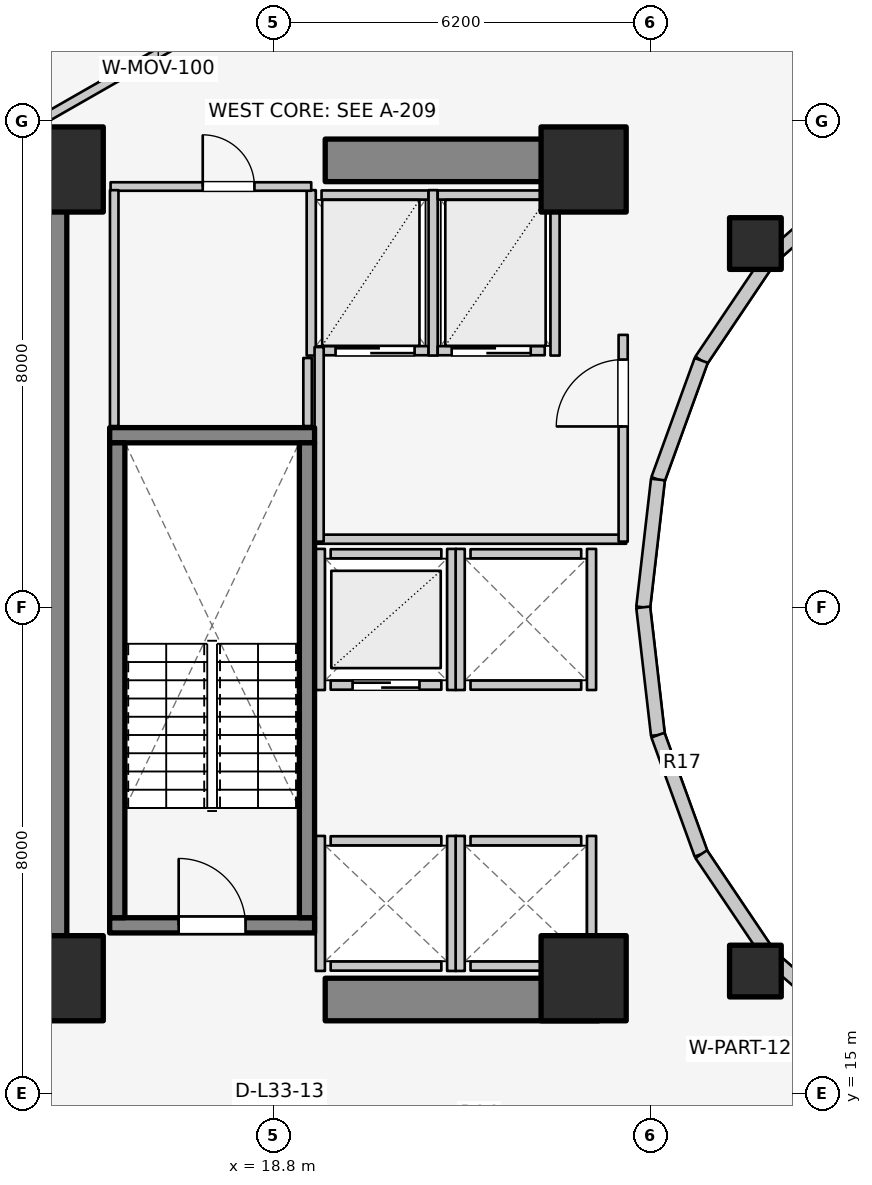
"""IFC4 building model, lengths in metres.
Left out: names, types, materials, properties, quantities, classifications, styles, units other than length and angle.
Written with IfcOpenShell. Run it as: python <this file> out.ifc"""

import sys

from ifc_helpers import new_model, si_unit, direction, frame, frame_2d, origin, origin_2d, place, context, subcontext, project, spatial, rectangle, extrude, element, fill, save


model = new_model("IFC4")
c1 = context("Model", 3, precision=1e-05, world=origin(), true_north=direction((0.0, 1.0)))
c2 = subcontext(c1, "Body", "Model", "MODEL_VIEW")
j1 = project(units=[si_unit("LENGTHUNIT", "METRE"), si_unit("PLANEANGLEUNIT", "RADIAN")], contexts=[c1])
p1 = place(None, origin())
s1 = spatial("IfcSite", under=j1, at=p1, CompositionType="ELEMENT")
p2 = place(p1, origin())
s2 = spatial("IfcBuilding", under=s1, at=p2, CompositionType="ELEMENT")
p3 = place(p2, frame((0.0, 0.0, 110.4)))
s3 = spatial("IfcBuildingStorey", under=s2, at=p3, CompositionType="ELEMENT", Elevation=110.4)
p4 = place(p3, frame((15.05, 17.05, 0.0), z_axis=(0.0, 0.0, 1.0), x_axis=(0.0, 1.0, 0.0)))
e1 = element("IfcWall", 1, at=p4, inside=s3, PredefinedType="SHEAR", context=c2, shape_type="SweptSolid", body=[
    extrude(rectangle(XDim=12.8, YDim=0.7, at=frame_2d((6.4, 0.0))), origin(), (0.0, 0.0, 1.0), 3.1),
])
for number, where, z_axis, x_axis in (
    (2, (19.65, 16.55, 0.0), (0.0, 0.0, 1.0), (1.0, 0.0, 0.0)),
    (3, (19.65, 30.35, 0.0), (0.0, 0.0, 1.0), (1.0, 0.0, 0.0)),
):
    element("IfcWall", number, at=place(p3, frame(where, z_axis=z_axis, x_axis=x_axis)), inside=s3, PredefinedType="SHEAR", context=c2, shape_type="SweptSolid", body=[
        extrude(rectangle(XDim=4.5, YDim=0.7, at=frame_2d((2.25, 0.0))), origin(), (0.0, 0.0, 1.0), 3.1),
    ])
p5 = place(p3, frame((16.105, 17.77, 0.0), z_axis=(0.0, 0.0, 1.0), x_axis=(1.0, 0.0, 0.0)))
e4 = element("IfcWall", 4, at=p5, inside=s3, PredefinedType="SOLIDWALL", context=c2, shape_type="SweptSolid", body=[
    extrude(rectangle(XDim=3.37, YDim=0.25, at=frame_2d((1.685, 0.0))), origin(), (0.0, 0.0, 1.0), 3.1),
])
p6 = place(p5, frame((1.135, 0.0, 0.0)))
e5 = element("IfcOpeningElement", 5, at=p6, cuts=e4, PredefinedType="OPENING", context=c2, shape_type="SweptSolid", body=[
    extrude(rectangle(XDim=1.1, YDim=2.1, at=frame_2d((0.55, 1.05))), frame((0.0, 0.135, 0.0), z_axis=(0.0, -1.0, 0.0), x_axis=(1.0, 0.0, 0.0)), (0.0, 0.0, 1.0), 0.27),
])
p7 = place(p3, frame((16.105, 25.83, 0.0), z_axis=(0.0, 0.0, 1.0), x_axis=(1.0, 0.0, 0.0)))
e6 = element("IfcWall", 6, at=p7, inside=s3, PredefinedType="SOLIDWALL", context=c2, shape_type="SweptSolid", body=[
    extrude(rectangle(XDim=3.37, YDim=0.25, at=frame_2d((1.685, 0.0))), origin(), (0.0, 0.0, 1.0), 3.1),
])
for number, where, z_axis, x_axis in (
    (7, (16.23, 17.895, 0.0), (0.0, 0.0, 1.0), (0.0, 1.0, 0.0)),
    (8, (19.35, 17.895, 0.0), (0.0, 0.0, 1.0), (0.0, 1.0, 0.0)),
):
    element("IfcWall", number, at=place(p3, frame(where, z_axis=z_axis, x_axis=x_axis)), inside=s3, PredefinedType="SOLIDWALL", context=c2, shape_type="SweptSolid", body=[
        extrude(rectangle(XDim=7.81, YDim=0.25, at=frame_2d((3.905, 0.0))), origin(), (0.0, 0.0, 1.0), 3.1),
    ])
for number, where, z_axis, x_axis in (
    (9, (15.3, 16.9, 0.0), (0.0, 0.0, 1.0), (1.0, 0.0, 0.0)),
    (10, (23.9, 16.9, 0.0), (0.0, 0.0, 1.0), (1.0, 0.0, 0.0)),
    (11, (23.9, 30.2, 0.0), (0.0, 0.0, 1.0), (1.0, 0.0, 0.0)),
    (12, (15.3, 30.2, 0.0), (0.0, 0.0, 1.0), (1.0, 0.0, 0.0)),
):
    element("IfcColumn", number, at=place(p3, frame(where, z_axis=z_axis, x_axis=x_axis)), inside=s3, PredefinedType="COLUMN", context=c2, shape_type="SweptSolid", body=[
        extrude(rectangle(XDim=1.4, YDim=1.4, at=origin_2d()), origin(), (0.0, 0.0, 1.0), 3.1),
    ])
for number, where, z_axis, x_axis in (
    (13, (26.725, 28.982, 0.0), (0.0, 0.0, 1.0), (1.0, 0.0, 0.0)),
    (14, (26.725, 17.018, 0.0), (0.0, 0.0, 1.0), (1.0, 0.0, 0.0)),
):
    element("IfcColumn", number, at=place(p3, frame(where, z_axis=z_axis, x_axis=x_axis)), inside=s3, PredefinedType="COLUMN", context=c2, shape_type="SweptSolid", body=[
        extrude(rectangle(XDim=0.85, YDim=0.85, at=origin_2d()), origin(), (0.0, 0.0, 1.0), 3.1),
    ])
p8 = place(p3, frame((28.44, 30.032, 0.0), z_axis=(0.0, 0.0, 1.0), x_axis=(-0.752576694707, -0.658504607869, 0.0)))
e15 = element("IfcWall", 15, at=p8, inside=s3, PredefinedType="STANDARD", context=c2, shape_type="SweptSolid", body=[
    extrude(rectangle(XDim=1.959, YDim=0.23, at=frame_2d((0.98, 0.0))), origin(), (0.0, 0.0, 1.0), 1.22),
])
p9 = place(p3, frame((26.965, 28.742, 0.0), z_axis=(0.0, 0.0, 1.0), x_axis=(-0.558197800898, -0.829707909492, 0.0)))
e16 = element("IfcWall", 16, at=p9, inside=s3, PredefinedType="STANDARD", context=c2, shape_type="SweptSolid", body=[
    extrude(rectangle(XDim=2.027, YDim=0.23, at=frame_2d((1.013, 0.0))), origin(), (0.0, 0.0, 1.0), 1.22),
])
p10 = place(p3, frame((25.834, 27.06, 0.0), z_axis=(0.0, 0.0, 1.0), x_axis=(-0.341423187295, -0.93990968033, 0.0)))
e17 = element("IfcWall", 17, at=p10, inside=s3, PredefinedType="STANDARD", context=c2, shape_type="SweptSolid", body=[
    extrude(rectangle(XDim=2.084, YDim=0.23, at=frame_2d((1.042, 0.0))), origin(), (0.0, 0.0, 1.0), 2.56),
])
for number, where, z_axis, x_axis in (
    (18, (25.123, 25.102, 0.0), (0.0, 0.0, 1.0), (-0.115, -0.993, 0.0)),
    (19, (24.88, 23.0, 0.0), (0.0, 0.0, 1.0), (0.115, -0.993, 0.0)),
):
    element("IfcWall", number, at=place(p3, frame(where, z_axis=z_axis, x_axis=x_axis)), inside=s3, PredefinedType="STANDARD", context=c2, shape_type="SweptSolid", body=[
        extrude(rectangle(XDim=2.115, YDim=0.23, at=frame_2d((1.058, 0.0))), origin(), (0.0, 0.0, 1.0), 2.56),
    ])
p11 = place(p3, frame((25.123, 20.898, 0.0), z_axis=(0.0, 0.0, 1.0), x_axis=(0.341423187295, -0.93990968033, 0.0)))
e20 = element("IfcWall", 20, at=p11, inside=s3, PredefinedType="STANDARD", context=c2, shape_type="SweptSolid", body=[
    extrude(rectangle(XDim=2.084, YDim=0.23, at=frame_2d((1.042, 0.0))), origin(), (0.0, 0.0, 1.0), 2.56),
])
p12 = place(p3, frame((25.834, 18.94, 0.0), z_axis=(0.0, 0.0, 1.0), x_axis=(0.558197800898, -0.829707909492, 0.0)))
e21 = element("IfcWall", 21, at=p12, inside=s3, PredefinedType="STANDARD", context=c2, shape_type="SweptSolid", body=[
    extrude(rectangle(XDim=2.027, YDim=0.23, at=frame_2d((1.013, 0.0))), origin(), (0.0, 0.0, 1.0), 1.22),
])
p13 = place(p3, frame((26.965, 17.258, 0.0), z_axis=(0.0, 0.0, 1.0), x_axis=(0.752576694707, -0.658504607869, 0.0)))
e22 = element("IfcWall", 22, at=p13, inside=s3, PredefinedType="STANDARD", context=c2, shape_type="SweptSolid", body=[
    extrude(rectangle(XDim=1.959, YDim=0.23, at=frame_2d((0.98, 0.0))), origin(), (0.0, 0.0, 1.0), 1.22),
])
for number, where, z_axis, x_axis in (
    (23, (19.74, 19.16, 0.0), (0.0, 0.0, 1.0), (1.0, 0.0, 0.0)),
    (24, (19.74, 17.1, 0.0), (0.0, 0.0, 1.0), (1.0, 0.0, 0.0)),
):
    element("IfcWall", number, at=place(p3, frame(where, z_axis=z_axis, x_axis=x_axis)), inside=s3, PredefinedType="SOLIDWALL", context=c2, shape_type="SweptSolid", body=[
        extrude(rectangle(XDim=1.82, YDim=0.15, at=frame_2d((0.91, 0.0))), origin(), (0.0, 0.0, 1.0), 2.575),
    ])
p14 = place(p3, frame((19.57, 17.02, 0.0), z_axis=(0.0, 0.0, 1.0), x_axis=(0.0, 1.0, 0.0)))
e25 = element("IfcWall", 25, at=p14, inside=s3, PredefinedType="SOLIDWALL", context=c2, shape_type="SweptSolid", body=[
    extrude(rectangle(XDim=2.22, YDim=0.15, at=frame_2d((1.11, 0.0))), origin(), (0.0, 0.0, 1.0), 2.12),
])
p15 = place(p3, frame((21.73, 17.02, 0.0), z_axis=(0.0, 0.0, 1.0), x_axis=(0.0, 1.0, 0.0)))
e26 = element("IfcWall", 26, at=p15, inside=s3, PredefinedType="SOLIDWALL", context=c2, shape_type="SweptSolid", body=[
    extrude(rectangle(XDim=2.22, YDim=0.15, at=frame_2d((1.11, 0.0))), origin(), (0.0, 0.0, 1.0), 2.575),
])
for number, where, z_axis, x_axis in (
    (27, (22.04, 19.16, 0.0), (0.0, 0.0, 1.0), (1.0, 0.0, 0.0)),
    (28, (22.04, 17.1, 0.0), (0.0, 0.0, 1.0), (1.0, 0.0, 0.0)),
):
    element("IfcWall", number, at=place(p3, frame(where, z_axis=z_axis, x_axis=x_axis)), inside=s3, PredefinedType="SOLIDWALL", context=c2, shape_type="SweptSolid", body=[
        extrude(rectangle(XDim=1.82, YDim=0.15, at=frame_2d((0.91, 0.0))), origin(), (0.0, 0.0, 1.0), 2.12),
    ])
p16 = place(p3, frame((21.87, 17.02, 0.0), z_axis=(0.0, 0.0, 1.0), x_axis=(0.0, 1.0, 0.0)))
e29 = element("IfcWall", 29, at=p16, inside=s3, PredefinedType="SOLIDWALL", context=c2, shape_type="SweptSolid", body=[
    extrude(rectangle(XDim=2.22, YDim=0.15, at=frame_2d((1.11, 0.0))), origin(), (0.0, 0.0, 1.0), 2.575),
])
p17 = place(p3, frame((24.03, 17.02, 0.0), z_axis=(0.0, 0.0, 1.0), x_axis=(0.0, 1.0, 0.0)))
e30 = element("IfcWall", 30, at=p17, inside=s3, PredefinedType="SOLIDWALL", context=c2, shape_type="SweptSolid", body=[
    extrude(rectangle(XDim=2.22, YDim=0.15, at=frame_2d((1.11, 0.0))), origin(), (0.0, 0.0, 1.0), 1.873),
])
p18 = place(p3, frame((19.74, 21.72, 0.0), z_axis=(0.0, 0.0, 1.0), x_axis=(1.0, 0.0, 0.0)))
e31 = element("IfcWall", 31, at=p18, inside=s3, PredefinedType="SOLIDWALL", context=c2, shape_type="SweptSolid", body=[
    extrude(rectangle(XDim=1.82, YDim=0.15, at=frame_2d((0.91, 0.0))), origin(), (0.0, 0.0, 1.0), 2.575),
])
p19 = place(p18, frame((0.36, 0.0, 0.0)))
e32 = element("IfcOpeningElement", 32, at=p19, cuts=e31, PredefinedType="OPENING", context=c2, shape_type="SweptSolid", body=[
    extrude(rectangle(XDim=1.1, YDim=2.1, at=frame_2d((0.55, 1.05))), frame((0.0, 0.085, 0.0), z_axis=(0.0, -1.0, 0.0), x_axis=(1.0, 0.0, 0.0)), (0.0, 0.0, 1.0), 0.17),
])
p20 = place(p3, frame((19.74, 23.88, 0.0), z_axis=(0.0, 0.0, 1.0), x_axis=(1.0, 0.0, 0.0)))
e33 = element("IfcWall", 33, at=p20, inside=s3, PredefinedType="SOLIDWALL", context=c2, shape_type="SweptSolid", body=[
    extrude(rectangle(XDim=1.82, YDim=0.15, at=frame_2d((0.91, 0.0))), origin(), (0.0, 0.0, 1.0), 2.575),
])
for number, where, z_axis, x_axis in (
    (34, (19.57, 21.64, 0.0), (0.0, 0.0, 1.0), (0.0, 1.0, 0.0)),
    (35, (21.73, 21.64, 0.0), (0.0, 0.0, 1.0), (0.0, 1.0, 0.0)),
):
    element("IfcWall", number, at=place(p3, frame(where, z_axis=z_axis, x_axis=x_axis)), inside=s3, PredefinedType="SOLIDWALL", context=c2, shape_type="SweptSolid", body=[
        extrude(rectangle(XDim=2.32, YDim=0.15, at=frame_2d((1.16, 0.0))), origin(), (0.0, 0.0, 1.0), 2.575),
    ])
for number, where, z_axis, x_axis in (
    (36, (22.04, 21.72, 0.0), (0.0, 0.0, 1.0), (1.0, 0.0, 0.0)),
    (37, (22.04, 23.88, 0.0), (0.0, 0.0, 1.0), (1.0, 0.0, 0.0)),
):
    element("IfcWall", number, at=place(p3, frame(where, z_axis=z_axis, x_axis=x_axis)), inside=s3, PredefinedType="SOLIDWALL", context=c2, shape_type="SweptSolid", body=[
        extrude(rectangle(XDim=1.82, YDim=0.15, at=frame_2d((0.91, 0.0))), origin(), (0.0, 0.0, 1.0), 2.12),
    ])
p21 = place(p3, frame((21.87, 21.64, 0.0), z_axis=(0.0, 0.0, 1.0), x_axis=(0.0, 1.0, 0.0)))
e38 = element("IfcWall", 38, at=p21, inside=s3, PredefinedType="SOLIDWALL", context=c2, shape_type="SweptSolid", body=[
    extrude(rectangle(XDim=2.32, YDim=0.15, at=frame_2d((1.16, 0.0))), origin(), (0.0, 0.0, 1.0), 2.575),
])
p22 = place(p3, frame((24.03, 21.64, 0.0), z_axis=(0.0, 0.0, 1.0), x_axis=(0.0, 1.0, 0.0)))
e39 = element("IfcWall", 39, at=p22, inside=s3, PredefinedType="SOLIDWALL", context=c2, shape_type="SweptSolid", body=[
    extrude(rectangle(XDim=2.32, YDim=0.15, at=frame_2d((1.16, 0.0))), origin(), (0.0, 0.0, 1.0), 2.12),
])
p23 = place(p3, frame((19.59, 27.22, 0.0), z_axis=(0.0, 0.0, 1.0), x_axis=(1.0, 0.0, 0.0)))
e40 = element("IfcWall", 40, at=p23, inside=s3, PredefinedType="SOLIDWALL", context=c2, shape_type="SweptSolid", body=[
    extrude(rectangle(XDim=1.76, YDim=0.15, at=frame_2d((0.88, 0.0))), origin(), (0.0, 0.0, 1.0), 2.575),
])
p24 = place(p23, frame((0.23, 0.0, 0.0)))
e41 = element("IfcOpeningElement", 41, at=p24, cuts=e40, PredefinedType="OPENING", context=c2, shape_type="SweptSolid", body=[
    extrude(rectangle(XDim=1.3, YDim=2.1, at=frame_2d((0.65, 1.05))), frame((0.0, 0.085, 0.0), z_axis=(0.0, -1.0, 0.0), x_axis=(1.0, 0.0, 0.0)), (0.0, 0.0, 1.0), 0.17),
])
p25 = place(p3, frame((19.59, 29.78, 0.0), z_axis=(0.0, 0.0, 1.0), x_axis=(1.0, 0.0, 0.0)))
e42 = element("IfcWall", 42, at=p25, inside=s3, PredefinedType="SOLIDWALL", context=c2, shape_type="SweptSolid", body=[
    extrude(rectangle(XDim=1.76, YDim=0.15, at=frame_2d((0.88, 0.0))), origin(), (0.0, 0.0, 1.0), 2.575),
])
for number, where, z_axis, x_axis in (
    (43, (19.42, 27.14, 0.0), (0.0, 0.0, 1.0), (0.0, 1.0, 0.0)),
    (44, (21.425, 27.14, 0.0), (0.0, 0.0, 1.0), (0.0, 1.0, 0.0)),
):
    element("IfcWall", number, at=place(p3, frame(where, z_axis=z_axis, x_axis=x_axis)), inside=s3, PredefinedType="SOLIDWALL", context=c2, shape_type="SweptSolid", body=[
        extrude(rectangle(XDim=2.72, YDim=0.15, at=frame_2d((1.36, 0.0))), origin(), (0.0, 0.0, 1.0), 2.575),
    ])
p26 = place(p3, frame((21.5, 27.22, 0.0), z_axis=(0.0, 0.0, 1.0), x_axis=(1.0, 0.0, 0.0)))
e45 = element("IfcWall", 45, at=p26, inside=s3, PredefinedType="SOLIDWALL", context=c2, shape_type="SweptSolid", body=[
    extrude(rectangle(XDim=1.76, YDim=0.15, at=frame_2d((0.88, 0.0))), origin(), (0.0, 0.0, 1.0), 2.575),
])
p27 = place(p26, frame((0.23, 0.0, 0.0)))
e46 = element("IfcOpeningElement", 46, at=p27, cuts=e45, PredefinedType="OPENING", context=c2, shape_type="SweptSolid", body=[
    extrude(rectangle(XDim=1.3, YDim=2.1, at=frame_2d((0.65, 1.05))), frame((0.0, 0.085, 0.0), z_axis=(0.0, -1.0, 0.0), x_axis=(1.0, 0.0, 0.0)), (0.0, 0.0, 1.0), 0.17),
])
p28 = place(p3, frame((21.5, 29.78, 0.0), z_axis=(0.0, 0.0, 1.0), x_axis=(1.0, 0.0, 0.0)))
e47 = element("IfcWall", 47, at=p28, inside=s3, PredefinedType="SOLIDWALL", context=c2, shape_type="SweptSolid", body=[
    extrude(rectangle(XDim=1.76, YDim=0.15, at=frame_2d((0.88, 0.0))), origin(), (0.0, 0.0, 1.0), 2.575),
])
p29 = place(p3, frame((23.43, 27.14, 0.0), z_axis=(0.0, 0.0, 1.0), x_axis=(0.0, 1.0, 0.0)))
e48 = element("IfcWall", 48, at=p29, inside=s3, PredefinedType="SOLIDWALL", context=c2, shape_type="SweptSolid", body=[
    extrude(rectangle(XDim=2.72, YDim=0.15, at=frame_2d((1.36, 0.0))), origin(), (0.0, 0.0, 1.0), 2.575),
])
p30 = place(p3, frame((19.52, 24.12, 0.0), z_axis=(0.0, 0.0, 1.0), x_axis=(1.0, 0.0, 0.0)))
e49 = element("IfcWall", 49, at=p30, inside=s3, PredefinedType="PARTITIONING", context=c2, shape_type="SweptSolid", body=[
    extrude(rectangle(XDim=5.08, YDim=0.15, at=frame_2d((2.54, 0.0))), origin(), (0.0, 0.0, 1.0), 2.12),
])
p31 = place(p3, frame((19.55, 24.08, 0.0), z_axis=(0.0, 0.0, 1.0), x_axis=(0.0, 1.0, 0.0)))
e50 = element("IfcWall", 50, at=p31, inside=s3, PredefinedType="PARTITIONING", context=c2, shape_type="SweptSolid", body=[
    extrude(rectangle(XDim=3.2, YDim=0.15, at=frame_2d((1.6, 0.0))), origin(), (0.0, 0.0, 1.0), 2.575),
])
p32 = place(p3, frame((24.55, 24.08, 0.0), z_axis=(0.0, 0.0, 1.0), x_axis=(0.0, 1.0, 0.0)))
e51 = element("IfcWall", 51, at=p32, inside=s3, PredefinedType="PARTITIONING", context=c2, shape_type="SweptSolid", body=[
    extrude(rectangle(XDim=3.4, YDim=0.15, at=frame_2d((1.7, 0.0))), origin(), (0.0, 0.0, 1.0), 2.575),
])
p33 = place(p32, frame((1.894, 0.0, 0.0)))
e52 = element("IfcOpeningElement", 52, at=p33, cuts=e51, PredefinedType="OPENING", context=c2, shape_type="SweptSolid", body=[
    extrude(rectangle(XDim=1.1, YDim=2.1, at=frame_2d((0.55, 1.05))), frame((0.0, 0.085, 0.0), z_axis=(0.0, -1.0, 0.0), x_axis=(1.0, 0.0, 0.0)), (0.0, 0.0, 1.0), 0.17),
])
p34 = place(p3, frame((16.12, 29.92, 0.0), z_axis=(0.0, 0.0, 1.0), x_axis=(1.0, 0.0, 0.0)))
e53 = element("IfcWall", 53, at=p34, inside=s3, PredefinedType="PLUMBINGWALL", context=c2, shape_type="SweptSolid", body=[
    extrude(rectangle(XDim=3.3, YDim=0.14, at=frame_2d((1.65, 0.0))), origin(), (0.0, 0.0, 1.0), 2.575),
])
p35 = place(p34, frame((1.516, 0.0, 0.0)))
e54 = element("IfcOpeningElement", 54, at=p35, cuts=e53, PredefinedType="OPENING", context=c2, shape_type="SweptSolid", body=[
    extrude(rectangle(XDim=0.85, YDim=2.05, at=frame_2d((0.425, 1.025))), frame((0.0, 0.08, 0.0), z_axis=(0.0, -1.0, 0.0), x_axis=(1.0, 0.0, 0.0)), (0.0, 0.0, 1.0), 0.16),
])
p36 = place(p3, frame((16.18, 25.98, 0.0), z_axis=(0.0, 0.0, 1.0), x_axis=(0.0, 1.0, 0.0)))
e55 = element("IfcWall", 55, at=p36, inside=s3, PredefinedType="PLUMBINGWALL", context=c2, shape_type="SweptSolid", body=[
    extrude(rectangle(XDim=3.88, YDim=0.14, at=frame_2d((1.94, 0.0))), origin(), (0.0, 0.0, 1.0), 2.575),
])
p37 = place(p3, frame((19.36, 25.98, 0.0), z_axis=(0.0, 0.0, 1.0), x_axis=(0.0, 1.0, 0.0)))
e56 = element("IfcWall", 56, at=p37, inside=s3, PredefinedType="PLUMBINGWALL", context=c2, shape_type="SweptSolid", body=[
    extrude(rectangle(XDim=1.12, YDim=0.14, at=frame_2d((0.56, 0.0))), origin(), (0.0, 0.0, 1.0), 2.575),
])
p38 = place(p3, frame((17.243, 32.305, 0.0), z_axis=(0.0, 0.0, 1.0), x_axis=(-0.867991349648, -0.496579315857, 0.0)))
e57 = element("IfcWall", 57, at=p38, inside=s3, PredefinedType="PARTITIONING", context=c2, shape_type="SweptSolid", body=[
    extrude(rectangle(XDim=2.567, YDim=0.15, at=frame_2d((1.283, 0.0))), origin(), (0.0, 0.0, 1.0), 1.22),
])
p39 = place(p3, frame((28.45, 15.985, 0.0), z_axis=(0.0, 0.0, 1.0), x_axis=(-0.525627246902, -0.850714991824, 0.0)))
e58 = element("IfcWall", 58, at=p39, inside=s3, PredefinedType="PARTITIONING", context=c2, shape_type="SweptSolid", body=[
    extrude(rectangle(XDim=2.901, YDim=0.125, at=frame_2d((1.451, 0.0))), origin(), (0.0, 0.0, 1.0), 1.22),
])
p40 = place(p6, origin())
e59 = element("IfcDoor", 59, at=p40, inside=s3, OperationType="SINGLE_SWING_LEFT", PredefinedType="DOOR", context=c2, shape_type="SweptSolid", body=[
    extrude(rectangle(XDim=1.1, YDim=2.1, at=frame_2d((0.55, 1.05))), frame((0.0, 0.025, 0.0), z_axis=(0.0, -1.0, 0.0), x_axis=(1.0, 0.0, 0.0)), (0.0, 0.0, 1.0), 0.05),
])
fill(e5, e59)
p41 = place(p19, origin())
e60 = element("IfcDoor", 60, at=p41, inside=s3, OperationType="DOUBLE_DOOR_SLIDING", PredefinedType="DOOR", context=c2, shape_type="SweptSolid", body=[
    extrude(rectangle(XDim=1.1, YDim=2.1, at=frame_2d((0.55, 1.05))), frame((0.0, 0.025, 0.0), z_axis=(0.0, -1.0, 0.0), x_axis=(1.0, 0.0, 0.0)), (0.0, 0.0, 1.0), 0.05),
])
fill(e32, e60)
p42 = place(p24, origin())
e61 = element("IfcDoor", 61, at=p42, inside=s3, OperationType="DOUBLE_DOOR_SLIDING", PredefinedType="DOOR", context=c2, shape_type="SweptSolid", body=[
    extrude(rectangle(XDim=1.3, YDim=2.1, at=frame_2d((0.65, 1.05))), frame((0.0, 0.025, 0.0), z_axis=(0.0, -1.0, 0.0), x_axis=(1.0, 0.0, 0.0)), (0.0, 0.0, 1.0), 0.05),
])
fill(e41, e61)
p43 = place(p27, origin())
e62 = element("IfcDoor", 62, at=p43, inside=s3, OperationType="DOUBLE_DOOR_SLIDING", PredefinedType="DOOR", context=c2, shape_type="SweptSolid", body=[
    extrude(rectangle(XDim=1.3, YDim=2.1, at=frame_2d((0.65, 1.05))), frame((0.0, 0.025, 0.0), z_axis=(0.0, -1.0, 0.0), x_axis=(1.0, 0.0, 0.0)), (0.0, 0.0, 1.0), 0.05),
])
fill(e46, e62)
p44 = place(p33, origin())
e63 = element("IfcDoor", 63, at=p44, inside=s3, OperationType="SINGLE_SWING_LEFT", PredefinedType="DOOR", context=c2, shape_type="SweptSolid", body=[
    extrude(rectangle(XDim=1.1, YDim=2.1, at=frame_2d((0.55, 1.05))), frame((0.0, 0.025, 0.0), z_axis=(0.0, -1.0, 0.0), x_axis=(1.0, 0.0, 0.0)), (0.0, 0.0, 1.0), 0.05),
])
fill(e52, e63)
p45 = place(p35, origin())
e64 = element("IfcDoor", 64, at=p45, inside=s3, OperationType="SINGLE_SWING_LEFT", PredefinedType="DOOR", context=c2, shape_type="SweptSolid", body=[
    extrude(rectangle(XDim=0.85, YDim=2.05, at=frame_2d((0.425, 1.025))), frame((0.0, 0.025, 0.0), z_axis=(0.0, -1.0, 0.0), x_axis=(1.0, 0.0, 0.0)), (0.0, 0.0, 1.0), 0.05),
])
fill(e54, e64)
save(model, sys.argv[1])
